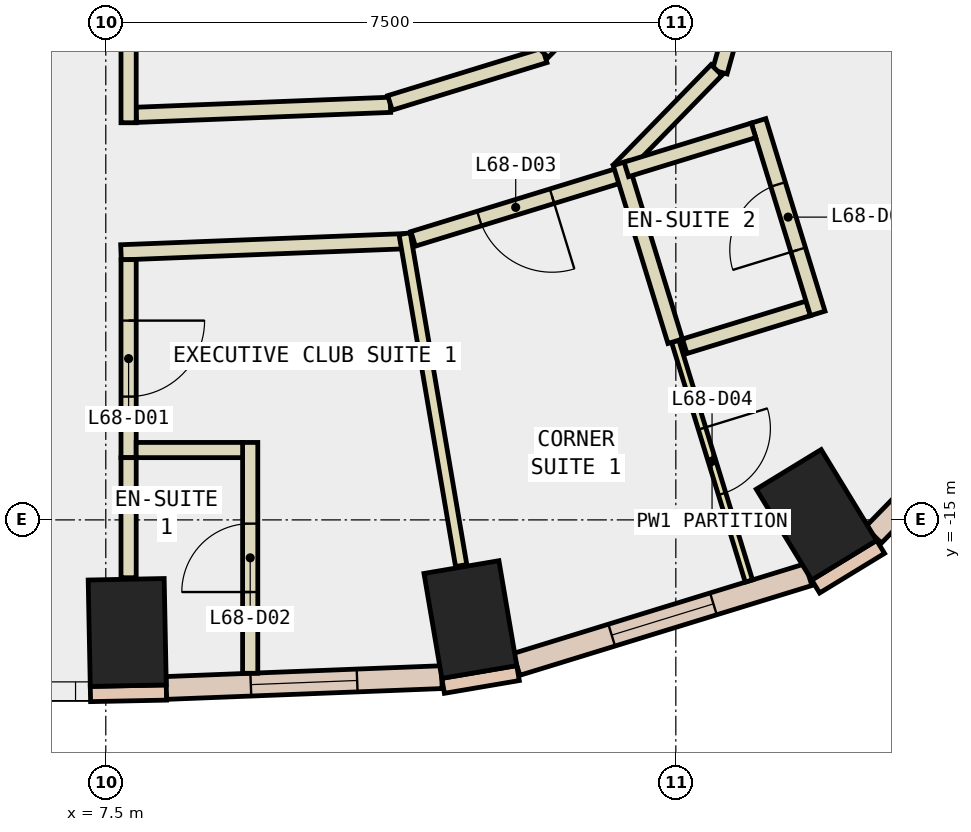
"""IFC4 building model, lengths in metres.
Left out: names, types, materials, properties, quantities, classifications, styles, units other than length and angle.
Written with IfcOpenShell. Run it as: python <this file> out.ifc"""

import sys

from ifc_helpers import new_model, si_unit, direction, frame, frame_2d, origin, origin_2d, place, context, subcontext, project, spatial, rectangle, extrude, element, fill, save


model = new_model("IFC4")
c1 = context("Model", 3, precision=1e-05, world=origin(), true_north=direction((0.0, 1.0)))
c2 = subcontext(c1, "Body", "Model", "MODEL_VIEW")
j1 = project(units=[si_unit("LENGTHUNIT", "METRE"), si_unit("PLANEANGLEUNIT", "RADIAN")], contexts=[c1])
p1 = place(None, origin())
s1 = spatial("IfcSite", under=j1, at=p1, CompositionType="ELEMENT")
p2 = place(p1, origin())
s2 = spatial("IfcBuilding", under=s1, at=p2, CompositionType="ELEMENT")
p3 = place(p2, frame((0.0, 0.0, 293.6)))
s3 = spatial("IfcBuildingStorey", under=s2, at=p3, CompositionType="ELEMENT", Elevation=293.6)
for number, where, z_axis, x_axis in (
    (1, (7.782, -16.481, -0.34), (0.0, 0.0, 1.0), (1.0, 0.02, 0.0)),
    (2, (12.297, -16.311, -0.34), (0.0, 0.0, 1.0), (0.986, 0.168, 0.0)),
    (3, (16.85, -14.933, -0.34), (0.0, 0.0, 1.0), (0.854, 0.521, 0.0)),
):
    element("IfcColumn", number, at=place(p3, frame(where, z_axis=z_axis, x_axis=x_axis)), inside=s3, PredefinedType="COLUMN", context=c2, shape_type="SweptSolid", body=[
        extrude(rectangle(XDim=1.0, YDim=1.4, at=origin_2d()), origin(), (0.0, 0.0, 1.0), 3.6),
    ])
for number, where, z_axis, x_axis in (
    (4, (7.298, -17.291, 0.0), (0.0, 0.0, 1.0), (1.0, 0.02, 0.0)),
    (5, (11.938, -17.183, 0.0), (0.0, 0.0, 1.0), (0.986, 0.168, 0.0)),
):
    element("IfcWall", number, at=place(p3, frame(where, z_axis=z_axis, x_axis=x_axis)), inside=s3, PredefinedType="STANDARD", context=c2, shape_type="SweptSolid", body=[
        extrude(rectangle(XDim=1.0, YDim=0.2, at=frame_2d((0.5, 0.0))), origin(), (0.0, 0.0, 1.0), 3.26),
    ])
p4 = place(p3, frame((16.84, -15.876, 0.0), z_axis=(0.0, 0.0, 1.0), x_axis=(0.853679739553, 0.520798331677, 0.0)))
e6 = element("IfcWall", 6, at=p4, inside=s3, PredefinedType="STANDARD", context=c2, shape_type="SweptSolid", body=[
    extrude(rectangle(XDim=1.0, YDim=0.2, at=frame_2d((0.5, 0.0))), origin(), (0.0, 0.0, 1.0), 3.26),
])
p5 = place(p3, frame((8.296, -17.211, 0.0), z_axis=(0.0, 0.0, 1.0), x_axis=(0.999234893779, 0.039110446866, 0.0)))
e7 = element("IfcWall", 7, at=p5, inside=s3, PredefinedType="STANDARD", context=c2, shape_type="SweptSolid", body=[
    extrude(rectangle(XDim=3.627, YDim=0.3, at=frame_2d((1.813, 0.0))), origin(), (0.0, 0.0, 1.0), 3.26),
])
p6 = place(p5, frame((1.113, 0.0, 0.9)))
e8 = element("IfcOpeningElement", 8, at=p6, cuts=e7, PredefinedType="OPENING", context=c2, shape_type="SweptSolid", body=[
    extrude(rectangle(XDim=1.4, YDim=2.0, at=frame_2d((0.7, 1.0))), frame((0.0, 0.16, 0.0), z_axis=(0.0, -1.0, 0.0), x_axis=(1.0, 0.0, 0.0)), (0.0, 0.0, 1.0), 0.32),
])
p7 = place(p3, frame((12.904, -16.901, 0.0), z_axis=(0.0, 0.0, 1.0), x_axis=(0.955866957005, 0.293799864716, 0.0)))
e9 = element("IfcWall", 9, at=p7, inside=s3, PredefinedType="STANDARD", context=c2, shape_type="SweptSolid", body=[
    extrude(rectangle(XDim=4.02, YDim=0.3, at=frame_2d((2.01, 0.0))), origin(), (0.0, 0.0, 1.0), 3.26),
])
p8 = place(p7, frame((1.31, 0.0, 0.9)))
e10 = element("IfcOpeningElement", 10, at=p8, cuts=e9, PredefinedType="OPENING", context=c2, shape_type="SweptSolid", body=[
    extrude(rectangle(XDim=1.4, YDim=2.0, at=frame_2d((0.7, 1.0))), frame((0.0, 0.16, 0.0), z_axis=(0.0, -1.0, 0.0), x_axis=(1.0, 0.0, 0.0)), (0.0, 0.0, 1.0), 0.32),
])
p9 = place(p3, frame((17.598, -15.2, 0.0), z_axis=(0.0, 0.0, 1.0), x_axis=(0.698555868355, 0.715555517614, 0.0)))
e11 = element("IfcWall", 11, at=p9, inside=s3, PredefinedType="STANDARD", context=c2, shape_type="SweptSolid", body=[
    extrude(rectangle(XDim=3.576, YDim=0.3, at=frame_2d((1.788, 0.0))), origin(), (0.0, 0.0, 1.0), 3.26),
])
p10 = place(p9, frame((1.088, 0.0, 0.9)))
e12 = element("IfcOpeningElement", 12, at=p10, cuts=e11, PredefinedType="OPENING", context=c2, shape_type="SweptSolid", body=[
    extrude(rectangle(XDim=1.4, YDim=2.0, at=frame_2d((0.7, 1.0))), frame((0.0, 0.16, 0.0), z_axis=(0.0, -1.0, 0.0), x_axis=(1.0, 0.0, 0.0)), (0.0, 0.0, 1.0), 0.32),
])
p11 = place(p3, frame((7.9, -9.671, 0.0), z_axis=(0.0, 0.0, 1.0), x_axis=(0.999223751627, 0.039394088186, 0.0)))
e13 = element("IfcWall", 13, at=p11, inside=s3, PredefinedType="PARTITIONING", context=c2, shape_type="SweptSolid", body=[
    extrude(rectangle(XDim=3.347, YDim=0.2, at=frame_2d((1.673, 0.0))), origin(), (0.0, 0.0, 1.0), 3.26),
])
p12 = place(p3, frame((11.239, -9.514, 0.0), z_axis=(0.0, 0.0, 1.0), x_axis=(0.955838469047, 0.293892533234, 0.0)))
e14 = element("IfcWall", 14, at=p12, inside=s3, PredefinedType="PARTITIONING", context=c2, shape_type="SweptSolid", body=[
    extrude(rectangle(XDim=2.13, YDim=0.2, at=frame_2d((1.065, 0.0))), origin(), (0.0, 0.0, 1.0), 3.26),
])
p13 = place(p3, frame((13.25, -8.846, 0.0), z_axis=(0.0, 0.0, 1.0), x_axis=(0.698333537371, 0.715772499181, 0.0)))
e15 = element("IfcWall", 15, at=p13, inside=s3, PredefinedType="PARTITIONING", context=c2, shape_type="SweptSolid", body=[
    extrude(rectangle(XDim=0.63, YDim=0.2, at=frame_2d((0.315, 0.0))), origin(), (0.0, 0.0, 1.0), 3.26),
])
p14 = place(p3, frame((11.474, -11.332, 0.0), z_axis=(0.0, 0.0, 1.0), x_axis=(-0.999232546126, -0.039170381199, 0.0)))
e16 = element("IfcWall", 16, at=p14, inside=s3, PredefinedType="PARTITIONING", context=c2, shape_type="SweptSolid", body=[
    extrude(rectangle(XDim=3.777, YDim=0.2, at=frame_2d((1.889, 0.0))), origin(), (0.0, 0.0, 1.0), 3.26),
])
p15 = place(p3, frame((14.243, -10.474, 0.0), z_axis=(0.0, 0.0, 1.0), x_axis=(-0.955937788993, -0.293569316475, 0.0)))
e17 = element("IfcWall", 17, at=p15, inside=s3, PredefinedType="PARTITIONING", context=c2, shape_type="SweptSolid", body=[
    extrude(rectangle(XDim=2.823, YDim=0.2, at=frame_2d((1.412, 0.0))), origin(), (0.0, 0.0, 1.0), 3.26),
])
p16 = place(p15, frame((0.912, 0.0, 0.0)))
e18 = element("IfcOpeningElement", 18, at=p16, cuts=e17, PredefinedType="OPENING", context=c2, shape_type="SweptSolid", body=[
    extrude(rectangle(XDim=1.0, YDim=2.1, at=frame_2d((0.5, 1.05))), frame((0.0, 0.11, 0.0), z_axis=(0.0, -1.0, 0.0), x_axis=(1.0, 0.0, 0.0)), (0.0, 0.0, 1.0), 0.22),
])
p17 = place(p3, frame((16.143, -7.096, 0.0), z_axis=(0.0, 0.0, 1.0), x_axis=(-0.270688011946, -0.962667128445, 0.0)))
e19 = element("IfcWall", 19, at=p17, inside=s3, PredefinedType="PARTITIONING", context=c2, shape_type="SweptSolid", body=[
    extrude(rectangle(XDim=2.088, YDim=0.2, at=frame_2d((1.044, 0.0))), origin(), (0.0, 0.0, 1.0), 3.26),
])
p18 = place(p3, frame((15.535, -9.081, 0.0), z_axis=(0.0, 0.0, 1.0), x_axis=(-0.698342132704, -0.715764113162, 0.0)))
e20 = element("IfcWall", 20, at=p18, inside=s3, PredefinedType="PARTITIONING", context=c2, shape_type="SweptSolid", body=[
    extrude(rectangle(XDim=1.836, YDim=0.2, at=frame_2d((0.918, 0.0))), origin(), (0.0, 0.0, 1.0), 3.26),
])
p19 = place(p3, frame((7.8, -5.899, 0.0), z_axis=(0.0, 0.0, 1.0), x_axis=(0.0, -1.0, 0.0)))
e21 = element("IfcWall", 21, at=p19, inside=s3, PredefinedType="PARTITIONING", context=c2, shape_type="SweptSolid", body=[
    extrude(rectangle(XDim=3.876, YDim=0.2, at=frame_2d((1.938, 0.0))), origin(), (0.0, 0.0, 1.0), 3.26),
])
p20 = place(p3, frame((7.8, -11.576, 0.0), z_axis=(0.0, 0.0, 1.0), x_axis=(0.0, -1.0, 0.0)))
e22 = element("IfcWall", 22, at=p20, inside=s3, PredefinedType="PARTITIONING", context=c2, shape_type="SweptSolid", body=[
    extrude(rectangle(XDim=2.605, YDim=0.2, at=frame_2d((1.302, 0.0))), origin(), (0.0, 0.0, 1.0), 3.26),
])
p21 = place(p20, frame((0.802, 0.0, 0.0)))
e23 = element("IfcOpeningElement", 23, at=p21, cuts=e22, PredefinedType="OPENING", context=c2, shape_type="SweptSolid", body=[
    extrude(rectangle(XDim=1.0, YDim=2.1, at=frame_2d((0.5, 1.05))), frame((0.0, 0.11, 0.0), z_axis=(0.0, -1.0, 0.0), x_axis=(1.0, 0.0, 0.0)), (0.0, 0.0, 1.0), 0.22),
])
p22 = place(p3, frame((7.8, -14.181, 0.0), z_axis=(0.0, 0.0, 1.0), x_axis=(0.0, -1.0, 0.0)))
e24 = element("IfcWall", 24, at=p22, inside=s3, PredefinedType="PARTITIONING", context=c2, shape_type="SweptSolid", body=[
    extrude(rectangle(XDim=1.58, YDim=0.2, at=frame_2d((0.79, 0.0))), origin(), (0.0, 0.0, 1.0), 3.26),
])
p23 = place(p3, frame((9.4, -17.018, 0.0), z_axis=(0.0, 0.0, 1.0), x_axis=(0.0, 1.0, 0.0)))
e25 = element("IfcWall", 25, at=p23, inside=s3, PredefinedType="PARTITIONING", context=c2, shape_type="SweptSolid", body=[
    extrude(rectangle(XDim=3.037, YDim=0.2, at=frame_2d((1.519, 0.0))), origin(), (0.0, 0.0, 1.0), 3.26),
])
p24 = place(p23, frame((1.069, 0.0, 0.0)))
e26 = element("IfcOpeningElement", 26, at=p24, cuts=e25, PredefinedType="OPENING", context=c2, shape_type="SweptSolid", body=[
    extrude(rectangle(XDim=0.9, YDim=2.1, at=frame_2d((0.45, 1.05))), frame((0.0, 0.11, 0.0), z_axis=(0.0, -1.0, 0.0), x_axis=(1.0, 0.0, 0.0)), (0.0, 0.0, 1.0), 0.22),
])
p25 = place(p3, frame((9.3, -14.081, 0.0), z_axis=(0.0, 0.0, 1.0), x_axis=(-1.0, 0.0, 0.0)))
e27 = element("IfcWall", 27, at=p25, inside=s3, PredefinedType="PARTITIONING", context=c2, shape_type="SweptSolid", body=[
    extrude(rectangle(XDim=1.4, YDim=0.2, at=frame_2d((0.7, 0.0))), origin(), (0.0, 0.0, 1.0), 3.26),
])
p26 = place(p3, frame((11.432, -11.234, 0.0), z_axis=(0.0, 0.0, 1.0), x_axis=(0.16797255243, -0.98579167253, 0.0)))
e28 = element("IfcWall", 28, at=p26, inside=s3, PredefinedType="PARTITIONING", context=c2, shape_type="SweptSolid", body=[
    extrude(rectangle(XDim=4.43, YDim=0.15, at=frame_2d((2.215, 0.0))), origin(), (0.0, 0.0, 1.0), 3.26),
])
p27 = place(p3, frame((14.992, -12.65, 0.0), z_axis=(0.0, 0.0, 1.0), x_axis=(0.293675064948, -0.955905307145, 0.0)))
e29 = element("IfcWall", 29, at=p27, inside=s3, PredefinedType="PARTITIONING", context=c2, shape_type="SweptSolid", body=[
    extrude(rectangle(XDim=3.3, YDim=0.1, at=frame_2d((1.65, 0.0))), origin(), (0.0, 0.0, 1.0), 3.26),
])
p28 = place(p27, frame((1.2, 0.0, 0.0)))
e30 = element("IfcOpeningElement", 30, at=p28, cuts=e29, PredefinedType="OPENING", context=c2, shape_type="SweptSolid", body=[
    extrude(rectangle(XDim=0.9, YDim=2.1, at=frame_2d((0.45, 1.05))), frame((0.0, 0.06, 0.0), z_axis=(0.0, -1.0, 0.0), x_axis=(1.0, 0.0, 0.0)), (0.0, 0.0, 1.0), 0.12),
])
p29 = place(p3, frame((14.272, -10.308, 0.0), z_axis=(0.0, 0.0, 1.0), x_axis=(0.293868765171, -0.955845776711, 0.0)))
e31 = element("IfcWall", 31, at=p29, inside=s3, PredefinedType="PARTITIONING", context=c2, shape_type="SweptSolid", body=[
    extrude(rectangle(XDim=2.45, YDim=0.2, at=frame_2d((1.225, 0.0))), origin(), (0.0, 0.0, 1.0), 3.26),
])
p30 = place(p3, frame((15.117, -12.716, 0.0), z_axis=(0.0, 0.0, 1.0), x_axis=(0.955940341053, 0.293561006177, 0.0)))
e32 = element("IfcWall", 32, at=p30, inside=s3, PredefinedType="PARTITIONING", context=c2, shape_type="SweptSolid", body=[
    extrude(rectangle(XDim=1.7, YDim=0.2, at=frame_2d((0.85, 0.0))), origin(), (0.0, 0.0, 1.0), 3.26),
])
p31 = place(p3, frame((16.867, -12.283, 0.0), z_axis=(0.0, 0.0, 1.0), x_axis=(-0.29397579302, 0.955812865114, 0.0)))
e33 = element("IfcWall", 33, at=p31, inside=s3, PredefinedType="PARTITIONING", context=c2, shape_type="SweptSolid", body=[
    extrude(rectangle(XDim=2.65, YDim=0.2, at=frame_2d((1.325, 0.0))), origin(), (0.0, 0.0, 1.0), 3.26),
])
p32 = place(p31, frame((0.875, 0.0, 0.0)))
e34 = element("IfcOpeningElement", 34, at=p32, cuts=e33, PredefinedType="OPENING", context=c2, shape_type="SweptSolid", body=[
    extrude(rectangle(XDim=0.9, YDim=2.1, at=frame_2d((0.45, 1.05))), frame((0.0, 0.11, 0.0), z_axis=(0.0, -1.0, 0.0), x_axis=(1.0, 0.0, 0.0)), (0.0, 0.0, 1.0), 0.22),
])
p33 = place(p3, frame((16.022, -9.875, 0.0), z_axis=(0.0, 0.0, 1.0), x_axis=(-0.955908620472, -0.293664279932, 0.0)))
e35 = element("IfcWall", 35, at=p33, inside=s3, PredefinedType="PARTITIONING", context=c2, shape_type="SweptSolid", body=[
    extrude(rectangle(XDim=1.75, YDim=0.2, at=frame_2d((0.875, 0.0))), origin(), (0.0, 0.0, 1.0), 3.26),
])
p34 = place(p6, origin())
e36 = element("IfcWindow", 36, at=p34, inside=s3, PartitioningType="SINGLE_PANEL", PredefinedType="WINDOW", context=c2, shape_type="SweptSolid", body=[
    extrude(rectangle(XDim=1.4, YDim=2.0, at=frame_2d((0.7, 1.0))), frame((0.0, 0.03, 0.0), z_axis=(0.0, -1.0, 0.0), x_axis=(1.0, 0.0, 0.0)), (0.0, 0.0, 1.0), 0.06),
])
fill(e8, e36)
p35 = place(p8, origin())
e37 = element("IfcWindow", 37, at=p35, inside=s3, PartitioningType="SINGLE_PANEL", PredefinedType="WINDOW", context=c2, shape_type="SweptSolid", body=[
    extrude(rectangle(XDim=1.4, YDim=2.0, at=frame_2d((0.7, 1.0))), frame((0.0, 0.03, 0.0), z_axis=(0.0, -1.0, 0.0), x_axis=(1.0, 0.0, 0.0)), (0.0, 0.0, 1.0), 0.06),
])
fill(e10, e37)
p36 = place(p21, origin())
e38 = element("IfcDoor", 38, at=p36, inside=s3, OperationType="SINGLE_SWING_LEFT", PredefinedType="DOOR", context=c2, shape_type="SweptSolid", body=[
    extrude(rectangle(XDim=1.0, YDim=2.1, at=frame_2d((0.5, 1.05))), frame((0.0, 0.025, 0.0), z_axis=(0.0, -1.0, 0.0), x_axis=(1.0, 0.0, 0.0)), (0.0, 0.0, 1.0), 0.05),
])
fill(e23, e38)
p37 = place(p24, origin())
e39 = element("IfcDoor", 39, at=p37, inside=s3, OperationType="SINGLE_SWING_RIGHT", PredefinedType="DOOR", context=c2, shape_type="SweptSolid", body=[
    extrude(rectangle(XDim=0.9, YDim=2.1, at=frame_2d((0.45, 1.05))), frame((0.0, 0.025, 0.0), z_axis=(0.0, -1.0, 0.0), x_axis=(1.0, 0.0, 0.0)), (0.0, 0.0, 1.0), 0.05),
])
fill(e26, e39)
p38 = place(p16, origin())
e40 = element("IfcDoor", 40, at=p38, inside=s3, OperationType="SINGLE_SWING_LEFT", PredefinedType="DOOR", context=c2, shape_type="SweptSolid", body=[
    extrude(rectangle(XDim=1.0, YDim=2.1, at=frame_2d((0.5, 1.05))), frame((0.0, 0.025, 0.0), z_axis=(0.0, -1.0, 0.0), x_axis=(1.0, 0.0, 0.0)), (0.0, 0.0, 1.0), 0.05),
])
fill(e18, e40)
p39 = place(p28, origin())
e41 = element("IfcDoor", 41, at=p39, inside=s3, OperationType="SINGLE_SWING_LEFT", PredefinedType="DOOR", context=c2, shape_type="SweptSolid", body=[
    extrude(rectangle(XDim=0.9, YDim=2.1, at=frame_2d((0.45, 1.05))), frame((0.0, 0.025, 0.0), z_axis=(0.0, -1.0, 0.0), x_axis=(1.0, 0.0, 0.0)), (0.0, 0.0, 1.0), 0.05),
])
fill(e30, e41)
p40 = place(p32, origin())
e42 = element("IfcDoor", 42, at=p40, inside=s3, OperationType="SINGLE_SWING_LEFT", PredefinedType="DOOR", context=c2, shape_type="SweptSolid", body=[
    extrude(rectangle(XDim=0.9, YDim=2.1, at=frame_2d((0.45, 1.05))), frame((0.0, 0.025, 0.0), z_axis=(0.0, -1.0, 0.0), x_axis=(1.0, 0.0, 0.0)), (0.0, 0.0, 1.0), 0.05),
])
fill(e34, e42)
save(model, sys.argv[1])
